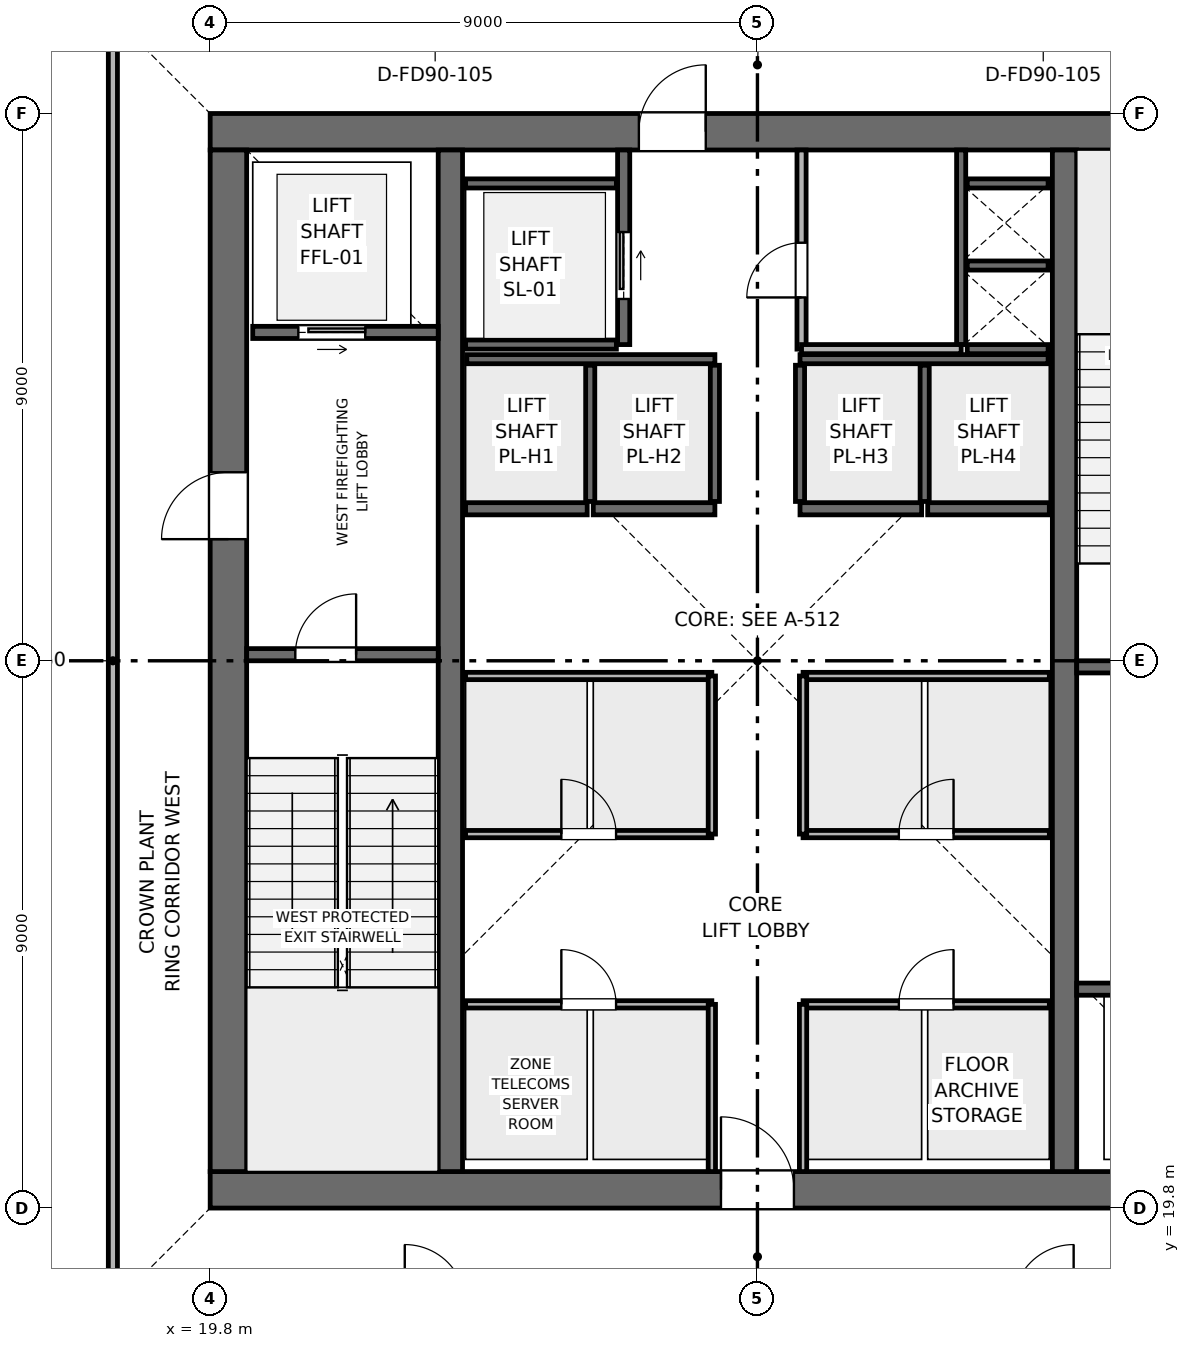
"""IFC4 building model, lengths in metres.
Left out: names, types, materials, properties, quantities, classifications, styles, units other than length and angle.
Written with IfcOpenShell. Run it as: python <this file> out.ifc"""

import sys

from ifc_helpers import new_model, si_unit, direction, frame, frame_2d, origin, place, context, subcontext, project, spatial, rectangle, extrude, element, fill, save


model = new_model("IFC4")
c1 = context("Model", 3, precision=1e-05, world=origin(), true_north=direction((0.0, 1.0)))
c2 = subcontext(c1, "Body", "Model", "MODEL_VIEW")
j1 = project(units=[si_unit("LENGTHUNIT", "METRE"), si_unit("PLANEANGLEUNIT", "RADIAN")], contexts=[c1])
p1 = place(None, origin())
s1 = spatial("IfcSite", under=j1, at=p1, CompositionType="ELEMENT")
p2 = place(p1, origin())
s2 = spatial("IfcBuilding", under=s1, at=p2, CompositionType="ELEMENT")
p3 = place(p2, frame((0.0, 0.0, 369.0)))
s3 = spatial("IfcBuildingStorey", under=s2, at=p3, CompositionType="ELEMENT", Elevation=369.0)
p4 = place(p3, frame((19.8, 20.1, 0.0), z_axis=(0.0, 0.0, 1.0), x_axis=(1.0, 0.0, 0.0)))
e1 = element("IfcWall", 1, at=p4, inside=s3, PredefinedType="SHEAR", context=c2, shape_type="SweptSolid", body=[
    extrude(rectangle(XDim=18.0, YDim=0.6, at=frame_2d((9.0, 0.0))), origin(), (0.0, 0.0, 1.0), 4.8),
])
p5 = place(p4, frame((8.4, 0.0, 0.0)))
e2 = element("IfcOpeningElement", 2, at=p5, cuts=e1, PredefinedType="OPENING", context=c2, shape_type="SweptSolid", body=[
    extrude(rectangle(XDim=1.2, YDim=2.2, at=frame_2d((0.6, 1.1))), frame((0.0, 0.31, 0.0), z_axis=(0.0, -1.0, 0.0), x_axis=(1.0, 0.0, 0.0)), (0.0, 0.0, 1.0), 0.62),
])
p6 = place(p3, frame((19.8, 37.5, 0.0), z_axis=(0.0, 0.0, 1.0), x_axis=(1.0, 0.0, 0.0)))
e3 = element("IfcWall", 3, at=p6, inside=s3, PredefinedType="SHEAR", context=c2, shape_type="SweptSolid", body=[
    extrude(rectangle(XDim=18.0, YDim=0.6, at=frame_2d((9.0, 0.0))), origin(), (0.0, 0.0, 1.0), 4.8),
])
p7 = place(p6, frame((7.05, 0.0, 0.0)))
e4 = element("IfcOpeningElement", 4, at=p7, cuts=e3, PredefinedType="OPENING", context=c2, shape_type="SweptSolid", body=[
    extrude(rectangle(XDim=1.1, YDim=2.15, at=frame_2d((0.55, 1.075))), frame((0.0, 0.31, 0.0), z_axis=(0.0, -1.0, 0.0), x_axis=(1.0, 0.0, 0.0)), (0.0, 0.0, 1.0), 0.62),
])
p8 = place(p3, frame((20.1, 20.4, 0.0), z_axis=(0.0, 0.0, 1.0), x_axis=(0.0, 1.0, 0.0)))
e5 = element("IfcWall", 5, at=p8, inside=s3, PredefinedType="SHEAR", context=c2, shape_type="SweptSolid", body=[
    extrude(rectangle(XDim=16.8, YDim=0.6, at=frame_2d((8.4, 0.0))), origin(), (0.0, 0.0, 1.0), 4.8),
])
p9 = place(p8, frame((10.4, 0.0, 0.0)))
e6 = element("IfcOpeningElement", 6, at=p9, cuts=e5, PredefinedType="OPENING", context=c2, shape_type="SweptSolid", body=[
    extrude(rectangle(XDim=1.1, YDim=2.15, at=frame_2d((0.55, 1.075))), frame((0.0, 0.31, 0.0), z_axis=(0.0, -1.0, 0.0), x_axis=(1.0, 0.0, 0.0)), (0.0, 0.0, 1.0), 0.62),
])
for number, where, z_axis, x_axis in (
    (7, (23.75, 20.4, 0.0), (0.0, 0.0, 1.0), (0.0, 1.0, 0.0)),
    (8, (33.85, 20.4, 0.0), (0.0, 0.0, 1.0), (0.0, 1.0, 0.0)),
):
    element("IfcWall", number, at=place(p3, frame(where, z_axis=z_axis, x_axis=x_axis)), inside=s3, PredefinedType="SHEAR", context=c2, shape_type="SweptSolid", body=[
        extrude(rectangle(XDim=16.8, YDim=0.4, at=frame_2d((8.4, 0.0))), origin(), (0.0, 0.0, 1.0), 4.8),
    ])
p10 = place(p3, frame((20.4, 28.9, 0.0), z_axis=(0.0, 0.0, 1.0), x_axis=(1.0, 0.0, 0.0)))
e9 = element("IfcWall", 9, at=p10, inside=s3, PredefinedType="SHEAR", context=c2, shape_type="SweptSolid", body=[
    extrude(rectangle(XDim=3.15, YDim=0.2, at=frame_2d((1.575, 0.0))), origin(), (0.0, 0.0, 1.0), 4.5),
])
p11 = place(p10, frame((0.8, 0.0, 0.0)))
e10 = element("IfcOpeningElement", 10, at=p11, cuts=e9, PredefinedType="OPENING", context=c2, shape_type="SweptSolid", body=[
    extrude(rectangle(XDim=1.0, YDim=2.1, at=frame_2d((0.5, 1.05))), frame((0.0, 0.11, 0.0), z_axis=(0.0, -1.0, 0.0), x_axis=(1.0, 0.0, 0.0)), (0.0, 0.0, 1.0), 0.22),
])
p12 = place(p3, frame((34.05, 28.7, 0.0), z_axis=(0.0, 0.0, 1.0), x_axis=(1.0, 0.0, 0.0)))
e11 = element("IfcWall", 11, at=p12, inside=s3, PredefinedType="SHEAR", context=c2, shape_type="SweptSolid", body=[
    extrude(rectangle(XDim=3.15, YDim=0.2, at=frame_2d((1.575, 0.0))), origin(), (0.0, 0.0, 1.0), 4.5),
])
p13 = place(p12, frame((0.8, 0.0, 0.0)))
e12 = element("IfcOpeningElement", 12, at=p13, cuts=e11, PredefinedType="OPENING", context=c2, shape_type="SweptSolid", body=[
    extrude(rectangle(XDim=1.0, YDim=2.1, at=frame_2d((0.5, 1.05))), frame((0.0, 0.11, 0.0), z_axis=(0.0, -1.0, 0.0), x_axis=(1.0, 0.0, 0.0)), (0.0, 0.0, 1.0), 0.22),
])
p14 = place(p3, frame((32.15, 34.0, 0.0), z_axis=(0.0, 0.0, 1.0), x_axis=(0.0, 1.0, 0.0)))
e13 = element("IfcWall", 13, at=p14, inside=s3, PredefinedType="SHEAR", context=c2, shape_type="SweptSolid", body=[
    extrude(rectangle(XDim=3.2, YDim=0.15, at=frame_2d((1.6, 0.0))), origin(), (0.0, 0.0, 1.0), 4.5),
])
for number, where, z_axis, x_axis in (
    (14, (32.25, 33.925, 0.0), (0.0, 0.0, 1.0), (1.0, 0.0, 0.0)),
    (15, (32.25, 35.3, 0.0), (0.0, 0.0, 1.0), (1.0, 0.0, 0.0)),
):
    element("IfcWall", number, at=place(p3, frame(where, z_axis=z_axis, x_axis=x_axis)), inside=s3, PredefinedType="SHEAR", context=c2, shape_type="SweptSolid", body=[
        extrude(rectangle(XDim=1.33, YDim=0.15, at=frame_2d((0.665, 0.0))), origin(), (0.0, 0.0, 1.0), 4.5),
    ])
p15 = place(p3, frame((20.5, 34.2, 0.0), z_axis=(0.0, 0.0, 1.0), x_axis=(1.0, 0.0, 0.0)))
e16 = element("IfcWall", 16, at=p15, inside=s3, PredefinedType="SHEAR", context=c2, shape_type="SweptSolid", body=[
    extrude(rectangle(XDim=3.05, YDim=0.2, at=frame_2d((1.525, 0.0))), origin(), (0.0, 0.0, 1.0), 4.5),
])
p16 = place(p15, frame((0.75, 0.0, 0.0)))
e17 = element("IfcOpeningElement", 17, at=p16, cuts=e16, PredefinedType="OPENING", context=c2, shape_type="SweptSolid", body=[
    extrude(rectangle(XDim=1.1, YDim=2.15, at=frame_2d((0.55, 1.075))), frame((0.0, 0.11, 0.0), z_axis=(0.0, -1.0, 0.0), x_axis=(1.0, 0.0, 0.0)), (0.0, 0.0, 1.0), 0.22),
])
p17 = place(p3, frame((34.05, 23.4, 0.0), z_axis=(0.0, 0.0, 1.0), x_axis=(1.0, 0.0, 0.0)))
e18 = element("IfcWall", 18, at=p17, inside=s3, PredefinedType="SHEAR", context=c2, shape_type="SweptSolid", body=[
    extrude(rectangle(XDim=3.05, YDim=0.2, at=frame_2d((1.525, 0.0))), origin(), (0.0, 0.0, 1.0), 4.5),
])
p18 = place(p17, frame((1.2, 0.0, 0.0)))
e19 = element("IfcOpeningElement", 19, at=p18, cuts=e18, PredefinedType="OPENING", context=c2, shape_type="SweptSolid", body=[
    extrude(rectangle(XDim=1.1, YDim=2.15, at=frame_2d((0.55, 1.075))), frame((0.0, 0.11, 0.0), z_axis=(0.0, -1.0, 0.0), x_axis=(1.0, 0.0, 0.0)), (0.0, 0.0, 1.0), 0.22),
])
p19 = place(p3, frame((26.6, 34.0, 0.0), z_axis=(0.0, 0.0, 1.0), x_axis=(0.0, 1.0, 0.0)))
e20 = element("IfcWall", 20, at=p19, inside=s3, PredefinedType="SHEAR", context=c2, shape_type="SweptSolid", body=[
    extrude(rectangle(XDim=3.2, YDim=0.2, at=frame_2d((1.6, 0.0))), origin(), (0.0, 0.0, 1.0), 4.5),
])
p20 = place(p19, frame((0.75, 0.0, 0.0)))
e21 = element("IfcOpeningElement", 21, at=p20, cuts=e20, PredefinedType="OPENING", context=c2, shape_type="SweptSolid", body=[
    extrude(rectangle(XDim=1.1, YDim=2.15, at=frame_2d((0.55, 1.075))), frame((0.0, 0.11, 0.0), z_axis=(0.0, -1.0, 0.0), x_axis=(1.0, 0.0, 0.0)), (0.0, 0.0, 1.0), 0.22),
])
for number, where, z_axis, x_axis in (
    (22, (24.0, 34.0, 0.0), (0.0, 0.0, 1.0), (1.0, 0.0, 0.0)),
    (23, (24.0, 36.65, 0.0), (0.0, 0.0, 1.0), (1.0, 0.0, 0.0)),
):
    element("IfcWall", number, at=place(p3, frame(where, z_axis=z_axis, x_axis=x_axis)), inside=s3, PredefinedType="SHEAR", context=c2, shape_type="SweptSolid", body=[
        extrude(rectangle(XDim=2.48, YDim=0.15, at=frame_2d((1.24, 0.0))), origin(), (0.0, 0.0, 1.0), 4.5),
    ])
for number, where, z_axis, x_axis in (
    (24, (24.0, 31.3, 0.0), (0.0, 0.0, 1.0), (1.0, 0.0, 0.0)),
    (25, (26.1, 31.3, 0.0), (0.0, 0.0, 1.0), (1.0, 0.0, 0.0)),
    (26, (29.5, 31.3, 0.0), (0.0, 0.0, 1.0), (1.0, 0.0, 0.0)),
    (27, (31.6, 31.3, 0.0), (0.0, 0.0, 1.0), (1.0, 0.0, 0.0)),
):
    element("IfcWall", number, at=place(p3, frame(where, z_axis=z_axis, x_axis=x_axis)), inside=s3, PredefinedType="SHEAR", context=c2, shape_type="SweptSolid", body=[
        extrude(rectangle(XDim=2.0, YDim=0.2, at=frame_2d((1.0, 0.0))), origin(), (0.0, 0.0, 1.0), 4.5),
    ])
p21 = place(p3, frame((32.25, 36.65, 0.0), z_axis=(0.0, 0.0, 1.0), x_axis=(1.0, 0.0, 0.0)))
e28 = element("IfcWall", 28, at=p21, inside=s3, PredefinedType="SHEAR", context=c2, shape_type="SweptSolid", body=[
    extrude(rectangle(XDim=1.33, YDim=0.15, at=frame_2d((0.665, 0.0))), origin(), (0.0, 0.0, 1.0), 4.5),
])
for number, where, z_axis, x_axis in (
    (29, (24.02, 33.76, 0.0), (0.0, 0.0, 1.0), (1.0, 0.0, 0.0)),
    (30, (29.5, 33.76, 0.0), (0.0, 0.0, 1.0), (1.0, 0.0, 0.0)),
):
    element("IfcWall", number, at=place(p3, frame(where, z_axis=z_axis, x_axis=x_axis)), inside=s3, PredefinedType="SHEAR", context=c2, shape_type="SweptSolid", body=[
        extrude(rectangle(XDim=4.08, YDim=0.15, at=frame_2d((2.04, 0.0))), origin(), (0.0, 0.0, 1.0), 4.5),
    ])
for number, where, z_axis, x_axis in (
    (31, (26.05, 31.42, 0.0), (0.0, 0.0, 1.0), (0.0, 1.0, 0.0)),
    (32, (28.1, 31.42, 0.0), (0.0, 0.0, 1.0), (0.0, 1.0, 0.0)),
    (33, (29.5, 31.42, 0.0), (0.0, 0.0, 1.0), (0.0, 1.0, 0.0)),
    (34, (31.55, 31.42, 0.0), (0.0, 0.0, 1.0), (0.0, 1.0, 0.0)),
):
    element("IfcWall", number, at=place(p3, frame(where, z_axis=z_axis, x_axis=x_axis)), inside=s3, PredefinedType="SHEAR", context=c2, shape_type="SweptSolid", body=[
        extrude(rectangle(XDim=2.24, YDim=0.15, at=frame_2d((1.12, 0.0))), origin(), (0.0, 0.0, 1.0), 4.5),
    ])
p22 = place(p3, frame((29.525, 33.925, 0.0), z_axis=(0.0, 0.0, 1.0), x_axis=(0.0, 1.0, 0.0)))
e35 = element("IfcWall", 35, at=p22, inside=s3, PredefinedType="PARTITIONING", context=c2, shape_type="SweptSolid", body=[
    extrude(rectangle(XDim=3.275, YDim=0.15, at=frame_2d((1.637, 0.0))), origin(), (0.0, 0.0, 1.0), 4.5),
])
p23 = place(p22, frame((0.85, 0.0, 0.0)))
e36 = element("IfcOpeningElement", 36, at=p23, cuts=e35, PredefinedType="OPENING", context=c2, shape_type="SweptSolid", body=[
    extrude(rectangle(XDim=0.9, YDim=2.1, at=frame_2d((0.45, 1.05))), frame((0.0, 0.085, 0.0), z_axis=(0.0, -1.0, 0.0), x_axis=(1.0, 0.0, 0.0)), (0.0, 0.0, 1.0), 0.17),
])
p24 = place(p3, frame((29.525, 33.925, 0.0), z_axis=(0.0, 0.0, 1.0), x_axis=(1.0, 0.0, 0.0)))
e37 = element("IfcWall", 37, at=p24, inside=s3, PredefinedType="PARTITIONING", context=c2, shape_type="SweptSolid", body=[
    extrude(rectangle(XDim=2.625, YDim=0.15, at=frame_2d((1.312, 0.0))), origin(), (0.0, 0.0, 1.0), 4.5),
])
p25 = place(p3, frame((24.0, 23.15, 0.0), z_axis=(0.0, 0.0, 1.0), x_axis=(1.0, 0.0, 0.0)))
e38 = element("IfcWall", 38, at=p25, inside=s3, PredefinedType="PARTITIONING", context=c2, shape_type="SweptSolid", body=[
    extrude(rectangle(XDim=4.05, YDim=0.12, at=frame_2d((2.025, 0.0))), origin(), (0.0, 0.0, 1.0), 4.5),
])
p26 = place(p25, frame((1.575, 0.0, 0.0)))
e39 = element("IfcOpeningElement", 39, at=p26, cuts=e38, PredefinedType="OPENING", context=c2, shape_type="SweptSolid", body=[
    extrude(rectangle(XDim=0.9, YDim=2.1, at=frame_2d((0.45, 1.05))), frame((0.0, 0.07, 0.0), z_axis=(0.0, -1.0, 0.0), x_axis=(1.0, 0.0, 0.0)), (0.0, 0.0, 1.0), 0.14),
])
p27 = place(p3, frame((28.05, 20.4, 0.0), z_axis=(0.0, 0.0, 1.0), x_axis=(0.0, 1.0, 0.0)))
e40 = element("IfcWall", 40, at=p27, inside=s3, PredefinedType="PARTITIONING", context=c2, shape_type="SweptSolid", body=[
    extrude(rectangle(XDim=2.75, YDim=0.12, at=frame_2d((1.375, 0.0))), origin(), (0.0, 0.0, 1.0), 4.5),
])
p28 = place(p3, frame((29.55, 23.15, 0.0), z_axis=(0.0, 0.0, 1.0), x_axis=(1.0, 0.0, 0.0)))
e41 = element("IfcWall", 41, at=p28, inside=s3, PredefinedType="PARTITIONING", context=c2, shape_type="SweptSolid", body=[
    extrude(rectangle(XDim=4.05, YDim=0.12, at=frame_2d((2.025, 0.0))), origin(), (0.0, 0.0, 1.0), 4.5),
])
p29 = place(p28, frame((1.575, 0.0, 0.0)))
e42 = element("IfcOpeningElement", 42, at=p29, cuts=e41, PredefinedType="OPENING", context=c2, shape_type="SweptSolid", body=[
    extrude(rectangle(XDim=0.9, YDim=2.1, at=frame_2d((0.45, 1.05))), frame((0.0, 0.07, 0.0), z_axis=(0.0, -1.0, 0.0), x_axis=(1.0, 0.0, 0.0)), (0.0, 0.0, 1.0), 0.14),
])
p30 = place(p3, frame((29.55, 20.4, 0.0), z_axis=(0.0, 0.0, 1.0), x_axis=(0.0, 1.0, 0.0)))
e43 = element("IfcWall", 43, at=p30, inside=s3, PredefinedType="PARTITIONING", context=c2, shape_type="SweptSolid", body=[
    extrude(rectangle(XDim=2.75, YDim=0.12, at=frame_2d((1.375, 0.0))), origin(), (0.0, 0.0, 1.0), 4.5),
])
p31 = place(p3, frame((24.0, 25.95, 0.0), z_axis=(0.0, 0.0, 1.0), x_axis=(1.0, 0.0, 0.0)))
e44 = element("IfcWall", 44, at=p31, inside=s3, PredefinedType="PARTITIONING", context=c2, shape_type="SweptSolid", body=[
    extrude(rectangle(XDim=4.05, YDim=0.12, at=frame_2d((2.025, 0.0))), origin(), (0.0, 0.0, 1.0), 4.5),
])
p32 = place(p31, frame((1.575, 0.0, 0.0)))
e45 = element("IfcOpeningElement", 45, at=p32, cuts=e44, PredefinedType="OPENING", context=c2, shape_type="SweptSolid", body=[
    extrude(rectangle(XDim=0.9, YDim=2.1, at=frame_2d((0.45, 1.05))), frame((0.0, 0.07, 0.0), z_axis=(0.0, -1.0, 0.0), x_axis=(1.0, 0.0, 0.0)), (0.0, 0.0, 1.0), 0.14),
])
p33 = place(p3, frame((24.0, 28.55, 0.0), z_axis=(0.0, 0.0, 1.0), x_axis=(1.0, 0.0, 0.0)))
e46 = element("IfcWall", 46, at=p33, inside=s3, PredefinedType="PARTITIONING", context=c2, shape_type="SweptSolid", body=[
    extrude(rectangle(XDim=4.05, YDim=0.12, at=frame_2d((2.025, 0.0))), origin(), (0.0, 0.0, 1.0), 4.5),
])
p34 = place(p3, frame((28.05, 25.95, 0.0), z_axis=(0.0, 0.0, 1.0), x_axis=(0.0, 1.0, 0.0)))
e47 = element("IfcWall", 47, at=p34, inside=s3, PredefinedType="PARTITIONING", context=c2, shape_type="SweptSolid", body=[
    extrude(rectangle(XDim=2.6, YDim=0.12, at=frame_2d((1.3, 0.0))), origin(), (0.0, 0.0, 1.0), 4.5),
])
p35 = place(p3, frame((29.55, 25.95, 0.0), z_axis=(0.0, 0.0, 1.0), x_axis=(1.0, 0.0, 0.0)))
e48 = element("IfcWall", 48, at=p35, inside=s3, PredefinedType="PARTITIONING", context=c2, shape_type="SweptSolid", body=[
    extrude(rectangle(XDim=4.05, YDim=0.12, at=frame_2d((2.025, 0.0))), origin(), (0.0, 0.0, 1.0), 4.5),
])
p36 = place(p35, frame((1.575, 0.0, 0.0)))
e49 = element("IfcOpeningElement", 49, at=p36, cuts=e48, PredefinedType="OPENING", context=c2, shape_type="SweptSolid", body=[
    extrude(rectangle(XDim=0.9, YDim=2.1, at=frame_2d((0.45, 1.05))), frame((0.0, 0.07, 0.0), z_axis=(0.0, -1.0, 0.0), x_axis=(1.0, 0.0, 0.0)), (0.0, 0.0, 1.0), 0.14),
])
p37 = place(p3, frame((29.55, 28.55, 0.0), z_axis=(0.0, 0.0, 1.0), x_axis=(1.0, 0.0, 0.0)))
e50 = element("IfcWall", 50, at=p37, inside=s3, PredefinedType="PARTITIONING", context=c2, shape_type="SweptSolid", body=[
    extrude(rectangle(XDim=4.05, YDim=0.12, at=frame_2d((2.025, 0.0))), origin(), (0.0, 0.0, 1.0), 4.5),
])
p38 = place(p3, frame((29.55, 25.95, 0.0), z_axis=(0.0, 0.0, 1.0), x_axis=(0.0, 1.0, 0.0)))
e51 = element("IfcWall", 51, at=p38, inside=s3, PredefinedType="PARTITIONING", context=c2, shape_type="SweptSolid", body=[
    extrude(rectangle(XDim=2.6, YDim=0.12, at=frame_2d((1.3, 0.0))), origin(), (0.0, 0.0, 1.0), 4.5),
])
p39 = place(p3, frame((18.2, 18.2, 0.0), z_axis=(0.0, 0.0, 1.0), x_axis=(0.0, 1.0, 0.0)))
e52 = element("IfcWall", 52, at=p39, inside=s3, PredefinedType="PARTITIONING", context=c2, shape_type="SweptSolid", body=[
    extrude(rectangle(XDim=21.2, YDim=0.15, at=frame_2d((10.6, 0.0))), origin(), (0.0, 0.0, 1.0), 4.085),
])
p40 = place(p11, origin())
e53 = element("IfcDoor", 53, at=p40, inside=s3, OperationType="SINGLE_SWING_RIGHT", PredefinedType="DOOR", context=c2, shape_type="SweptSolid", body=[
    extrude(rectangle(XDim=1.0, YDim=2.1, at=frame_2d((0.5, 1.05))), frame((0.0, 0.025, 0.0), z_axis=(0.0, -1.0, 0.0), x_axis=(1.0, 0.0, 0.0)), (0.0, 0.0, 1.0), 0.05),
])
fill(e10, e53)
p41 = place(p16, origin())
e54 = element("IfcDoor", 54, at=p41, inside=s3, OperationType="SLIDING_TO_RIGHT", PredefinedType="DOOR", context=c2, shape_type="SweptSolid", body=[
    extrude(rectangle(XDim=1.1, YDim=2.15, at=frame_2d((0.55, 1.075))), frame((0.0, 0.025, 0.0), z_axis=(0.0, -1.0, 0.0), x_axis=(1.0, 0.0, 0.0)), (0.0, 0.0, 1.0), 0.05),
])
fill(e17, e54)
p42 = place(p20, origin())
e55 = element("IfcDoor", 55, at=p42, inside=s3, OperationType="SLIDING_TO_RIGHT", PredefinedType="DOOR", context=c2, shape_type="SweptSolid", body=[
    extrude(rectangle(XDim=1.1, YDim=2.15, at=frame_2d((0.55, 1.075))), frame((0.0, 0.025, 0.0), z_axis=(0.0, -1.0, 0.0), x_axis=(1.0, 0.0, 0.0)), (0.0, 0.0, 1.0), 0.05),
])
fill(e21, e55)
p43 = place(p23, origin())
e56 = element("IfcDoor", 56, at=p43, inside=s3, OperationType="SINGLE_SWING_LEFT", PredefinedType="DOOR", context=c2, shape_type="SweptSolid", body=[
    extrude(rectangle(XDim=0.9, YDim=2.1, at=frame_2d((0.45, 1.05))), frame((0.0, 0.025, 0.0), z_axis=(0.0, -1.0, 0.0), x_axis=(1.0, 0.0, 0.0)), (0.0, 0.0, 1.0), 0.05),
])
fill(e36, e56)
p44 = place(p26, origin())
e57 = element("IfcDoor", 57, at=p44, inside=s3, OperationType="SINGLE_SWING_LEFT", PredefinedType="DOOR", context=c2, shape_type="SweptSolid", body=[
    extrude(rectangle(XDim=0.9, YDim=2.1, at=frame_2d((0.45, 1.05))), frame((0.0, 0.025, 0.0), z_axis=(0.0, -1.0, 0.0), x_axis=(1.0, 0.0, 0.0)), (0.0, 0.0, 1.0), 0.05),
])
fill(e39, e57)
p45 = place(p29, origin())
e58 = element("IfcDoor", 58, at=p45, inside=s3, OperationType="SINGLE_SWING_RIGHT", PredefinedType="DOOR", context=c2, shape_type="SweptSolid", body=[
    extrude(rectangle(XDim=0.9, YDim=2.1, at=frame_2d((0.45, 1.05))), frame((0.0, 0.025, 0.0), z_axis=(0.0, -1.0, 0.0), x_axis=(1.0, 0.0, 0.0)), (0.0, 0.0, 1.0), 0.05),
])
fill(e42, e58)
p46 = place(p32, origin())
e59 = element("IfcDoor", 59, at=p46, inside=s3, OperationType="SINGLE_SWING_LEFT", PredefinedType="DOOR", context=c2, shape_type="SweptSolid", body=[
    extrude(rectangle(XDim=0.9, YDim=2.1, at=frame_2d((0.45, 1.05))), frame((0.0, 0.025, 0.0), z_axis=(0.0, -1.0, 0.0), x_axis=(1.0, 0.0, 0.0)), (0.0, 0.0, 1.0), 0.05),
])
fill(e45, e59)
p47 = place(p36, origin())
e60 = element("IfcDoor", 60, at=p47, inside=s3, OperationType="SINGLE_SWING_RIGHT", PredefinedType="DOOR", context=c2, shape_type="SweptSolid", body=[
    extrude(rectangle(XDim=0.9, YDim=2.1, at=frame_2d((0.45, 1.05))), frame((0.0, 0.025, 0.0), z_axis=(0.0, -1.0, 0.0), x_axis=(1.0, 0.0, 0.0)), (0.0, 0.0, 1.0), 0.05),
])
fill(e49, e60)
p48 = place(p9, origin())
e61 = element("IfcDoor", 61, at=p48, inside=s3, OperationType="SINGLE_SWING_LEFT", PredefinedType="DOOR", context=c2, shape_type="SweptSolid", body=[
    extrude(rectangle(XDim=1.1, YDim=2.15, at=frame_2d((0.55, 1.075))), frame((0.0, 0.025, 0.0), z_axis=(0.0, -1.0, 0.0), x_axis=(1.0, 0.0, 0.0)), (0.0, 0.0, 1.0), 0.05),
])
fill(e6, e61)
p49 = place(p5, origin())
e62 = element("IfcDoor", 62, at=p49, inside=s3, OperationType="SINGLE_SWING_LEFT", PredefinedType="DOOR", context=c2, shape_type="SweptSolid", body=[
    extrude(rectangle(XDim=1.2, YDim=2.2, at=frame_2d((0.6, 1.1))), frame((0.0, 0.025, 0.0), z_axis=(0.0, -1.0, 0.0), x_axis=(1.0, 0.0, 0.0)), (0.0, 0.0, 1.0), 0.05),
])
fill(e2, e62)
p50 = place(p7, origin())
e63 = element("IfcDoor", 63, at=p50, inside=s3, OperationType="SINGLE_SWING_RIGHT", PredefinedType="DOOR", context=c2, shape_type="SweptSolid", body=[
    extrude(rectangle(XDim=1.1, YDim=2.15, at=frame_2d((0.55, 1.075))), frame((0.0, 0.025, 0.0), z_axis=(0.0, -1.0, 0.0), x_axis=(1.0, 0.0, 0.0)), (0.0, 0.0, 1.0), 0.05),
])
fill(e4, e63)
save(model, sys.argv[1])
